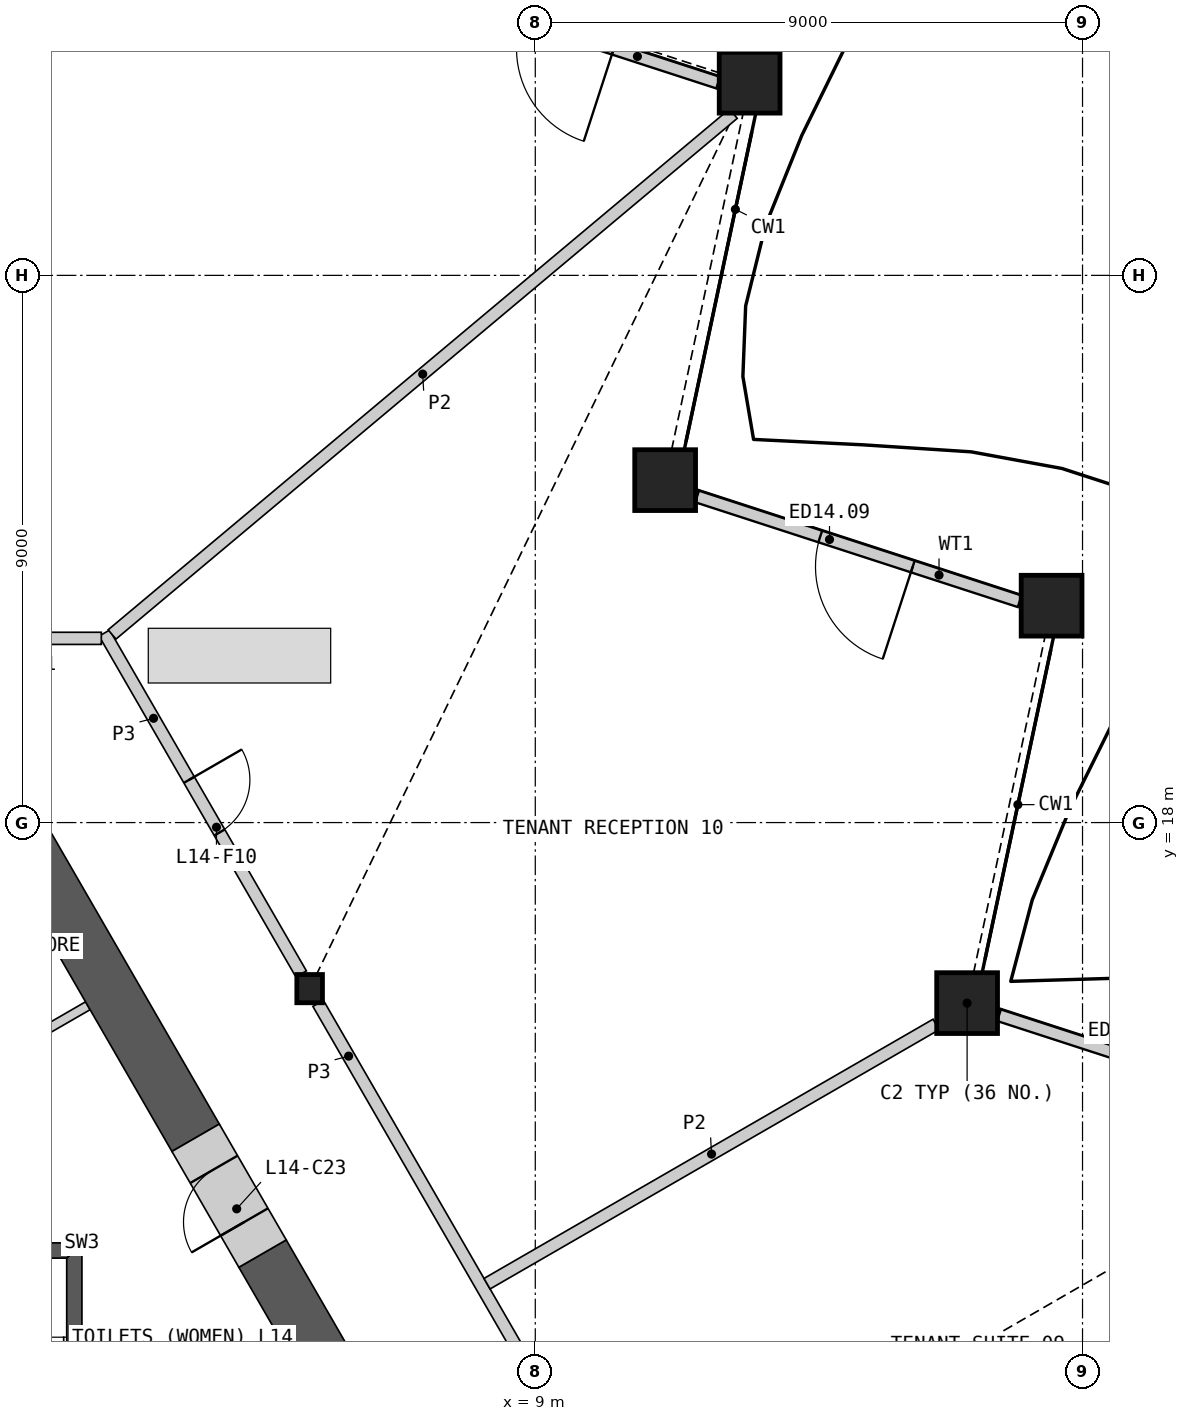
"""IFC4 building model, lengths in metres.
Left out: names, types, materials, properties, quantities, classifications, styles, units other than length and angle.
Written with IfcOpenShell. Run it as: python <this file> out.ifc"""

import sys

from ifc_helpers import new_model, si_unit, direction, frame, frame_2d, origin, origin_2d, place, context, subcontext, project, spatial, polyline, rectangle, hollow_rectangle, i_section, outline, extrude, element, fill, save


model = new_model("IFC4")
c1 = context("Model", 3, precision=1e-05, world=origin(), true_north=direction((0.0, 1.0)))
c2 = subcontext(c1, "Body", "Model", "MODEL_VIEW")
j1 = project(units=[si_unit("LENGTHUNIT", "METRE"), si_unit("PLANEANGLEUNIT", "RADIAN")], contexts=[c1])
p1 = place(None, origin())
s1 = spatial("IfcSite", under=j1, at=p1, CompositionType="ELEMENT")
p2 = place(p1, origin())
s2 = spatial("IfcBuilding", under=s1, at=p2, CompositionType="ELEMENT")
p3 = place(p2, frame((0.0, 0.0, 67.8)))
s3 = spatial("IfcBuildingStorey", under=s2, at=p3, CompositionType="ELEMENT", Elevation=67.8)
for number, where, z_axis, x_axis in (
    (1, (16.102, 15.031, 0.0), (0.0, 0.0, 1.0), (1.0, 0.0, 0.0)),
    (2, (17.491, 21.567, 0.0), (0.0, 0.0, 1.0), (1.0, 0.0, 0.0)),
    (3, (11.136, 23.632, 0.0), (0.0, 0.0, 1.0), (1.0, 0.0, 0.0)),
    (4, (12.525, 30.169, 0.0), (0.0, 0.0, 1.0), (1.0, 0.0, 0.0)),
):
    element("IfcColumn", number, at=place(p3, frame(where, z_axis=z_axis, x_axis=x_axis)), inside=s3, PredefinedType="COLUMN", context=c2, shape_type="SweptSolid", body=[
        extrude(hollow_rectangle(XDim=1.0, YDim=1.0, WallThickness=0.07, at=origin_2d()), origin(), (0.0, 0.0, 1.0), 4.2),
    ])
p4 = place(p3, frame((5.289, 15.269, 0.0), z_axis=(0.0, 0.0, 1.0), x_axis=(1.0, 0.0, 0.0)))
e5 = element("IfcColumn", 5, at=p4, inside=s3, PredefinedType="COLUMN", context=c2, shape_type="SweptSolid", body=[
    extrude(i_section(OverallWidth=0.421, OverallDepth=0.465, WebThickness=0.045, FlangeThickness=0.072, at=origin_2d()), origin(), (0.0, 0.0, 1.0), 4.2),
])
p5 = place(p3, frame((21.933, 13.107, 0.0), z_axis=(0.0, 0.0, 1.0), x_axis=(-0.951066864375, 0.308985144444, 0.0)))
e6 = element("IfcWall", 6, at=p5, inside=s3, PredefinedType="SOLIDWALL", context=c2, shape_type="SweptSolid", body=[
    extrude(rectangle(XDim=5.579, YDim=0.2, at=frame_2d((2.79, 0.0))), origin(), (0.0, 0.0, 1.0), 3.189),
])
p6 = place(p5, frame((1.9, 0.0, 0.0)))
e7 = element("IfcOpeningElement", 7, at=p6, cuts=e6, PredefinedType="OPENING", context=c2, shape_type="SweptSolid", body=[
    extrude(rectangle(XDim=1.6, YDim=2.4, at=frame_2d((0.8, 1.2))), frame((0.0, 0.11, 0.0), z_axis=(0.0, -1.0, 0.0), x_axis=(1.0, 0.0, 0.0)), (0.0, 0.0, 1.0), 0.22),
])
p7 = place(p3, frame((16.967, 21.64, 0.0), z_axis=(0.0, 0.0, 1.0), x_axis=(-0.951054004345, 0.309024725255, 0.0)))
e8 = element("IfcWall", 8, at=p7, inside=s3, PredefinedType="SOLIDWALL", context=c2, shape_type="SweptSolid", body=[
    extrude(rectangle(XDim=5.579, YDim=0.2, at=frame_2d((2.79, 0.0))), origin(), (0.0, 0.0, 1.0), 3.189),
])
p8 = place(p7, frame((1.849, 0.0, 0.0)))
e9 = element("IfcOpeningElement", 9, at=p8, cuts=e8, PredefinedType="OPENING", context=c2, shape_type="SweptSolid", body=[
    extrude(rectangle(XDim=1.6, YDim=2.4, at=frame_2d((0.8, 1.2))), frame((0.0, 0.11, 0.0), z_axis=(0.0, -1.0, 0.0), x_axis=(1.0, 0.0, 0.0)), (0.0, 0.0, 1.0), 0.22),
])
p9 = place(p3, frame((12.008, 30.17, 0.0), z_axis=(0.0, 0.0, 1.0), x_axis=(-0.951054939127, 0.309021848358, 0.0)))
e10 = element("IfcWall", 10, at=p9, inside=s3, PredefinedType="SOLIDWALL", context=c2, shape_type="SweptSolid", body=[
    extrude(rectangle(XDim=5.587, YDim=0.2, at=frame_2d((2.793, 0.0))), origin(), (0.0, 0.0, 1.0), 3.189),
])
p10 = place(p9, frame((1.805, 0.0, 0.0)))
e11 = element("IfcOpeningElement", 11, at=p10, cuts=e10, PredefinedType="OPENING", context=c2, shape_type="SweptSolid", body=[
    extrude(rectangle(XDim=1.6, YDim=2.4, at=frame_2d((0.8, 1.2))), frame((0.0, 0.11, 0.0), z_axis=(0.0, -1.0, 0.0), x_axis=(1.0, 0.0, 0.0)), (0.0, 0.0, 1.0), 0.22),
])
p11 = place(p3, origin())
e12 = element("IfcWall", 12, at=p11, inside=s3, PredefinedType="SHEAR", context=c2, shape_type="SweptSolid", body=[
    extrude(outline(polyline([(1.544, 5.237), (1.544, 11.087), (1.294, 10.837), (1.294, 5.237), (1.544, 5.237)])), origin(), (0.0, 0.0, 1.0), 3.8),
])
p12 = place(p3, origin())
e13 = element("IfcWall", 13, at=p12, inside=s3, PredefinedType="SHEAR", context=c2, shape_type="SweptSolid", body=[
    extrude(outline(polyline([(1.544, 11.087), (-1.544, 11.087), (-1.294, 10.837), (1.294, 10.837), (1.544, 11.087)])), origin(), (0.0, 0.0, 1.0), 3.8),
])
p13 = place(p3, frame((1.641, 14.987, 0.0), z_axis=(0.0, 0.0, 1.0), x_axis=(-0.86602253128, -0.50000497529, 0.0)))
e14 = element("IfcWall", 14, at=p13, inside=s3, PredefinedType="PARTITIONING", context=c2, shape_type="SweptSolid", body=[
    extrude(rectangle(XDim=5.685, YDim=0.15, at=frame_2d((2.843, 0.0))), origin(), (0.0, 0.0, 1.0), 3.8),
])
p14 = place(p3, frame((7.807, 5.208, 0.0), z_axis=(0.0, 0.0, 1.0), x_axis=(-0.499986664161, 0.866033103098, 0.0)))
e15 = element("IfcWall", 15, at=p14, inside=s3, PredefinedType="SHEAR", context=c2, shape_type="SweptSolid", body=[
    extrude(rectangle(XDim=6.586, YDim=0.9, at=frame_2d((3.293, 0.0))), origin(), (0.0, 0.0, 1.0), 3.8),
])
p15 = place(p3, frame((3.414, 12.816, 0.0), z_axis=(0.0, 0.0, 1.0), x_axis=(-0.500006596359, 0.866021595341, 0.0)))
e16 = element("IfcWall", 16, at=p15, inside=s3, PredefinedType="SHEAR", context=c2, shape_type="SweptSolid", body=[
    extrude(rectangle(XDim=6.049, YDim=0.9, at=frame_2d((3.025, 0.0))), origin(), (0.0, 0.0, 1.0), 3.8),
])
p16 = place(p3, frame((4.514, 10.911, 0.0), z_axis=(0.0, 0.0, 1.0), x_axis=(-0.50002983664, 0.866008176907, 0.0)))
e17 = element("IfcWall", 17, at=p16, inside=s3, PredefinedType="SHEAR", context=c2, shape_type="SweptSolid", body=[
    extrude(rectangle(XDim=2.2, YDim=0.9, at=frame_2d((1.1, 0.0))), origin(), (0.0, 0.0, 1.0), 3.8),
])
p17 = place(p16, frame((0.6, 0.0, 0.0)))
e18 = element("IfcOpeningElement", 18, at=p17, cuts=e17, PredefinedType="OPENING", context=c2, shape_type="SweptSolid", body=[
    extrude(rectangle(XDim=1.0, YDim=2.1, at=frame_2d((0.5, 1.05))), frame((0.0, 0.46, 0.0), z_axis=(0.0, -1.0, 0.0), x_axis=(1.0, 0.0, 0.0)), (0.0, 0.0, 1.0), 0.92),
])
p18 = place(p3, frame((5.429, 15.026, 0.0), z_axis=(0.0, 0.0, 1.0), x_axis=(0.50001002959, -0.86601961312, 0.0)))
e19 = element("IfcWall", 19, at=p18, inside=s3, PredefinedType="PARTITIONING", context=c2, shape_type="SweptSolid", body=[
    extrude(rectangle(XDim=10.019, YDim=0.2, at=frame_2d((5.009, 0.0))), origin(), (0.0, 0.0, 1.0), 3.8),
])
p19 = place(p18, frame((7.165, 0.0, 0.0)))
e20 = element("IfcOpeningElement", 20, at=p19, cuts=e19, PredefinedType="OPENING", context=c2, shape_type="SweptSolid", body=[
    extrude(rectangle(XDim=1.0, YDim=2.1, at=frame_2d((0.5, 1.05))), frame((0.0, 0.11, 0.0), z_axis=(0.0, -1.0, 0.0), x_axis=(1.0, 0.0, 0.0)), (0.0, 0.0, 1.0), 0.22),
])
p20 = place(p3, frame((1.913, 21.116, 0.0), z_axis=(0.0, 0.0, 1.0), x_axis=(0.500001069878, -0.866024786089, 0.0)))
e21 = element("IfcWall", 21, at=p20, inside=s3, PredefinedType="PARTITIONING", context=c2, shape_type="SweptSolid", body=[
    extrude(rectangle(XDim=6.473, YDim=0.2, at=frame_2d((3.236, 0.0))), origin(), (0.0, 0.0, 1.0), 3.8),
])
p21 = place(p20, frame((2.787, 0.0, 0.0)))
e22 = element("IfcOpeningElement", 22, at=p21, cuts=e21, PredefinedType="OPENING", context=c2, shape_type="SweptSolid", body=[
    extrude(rectangle(XDim=1.0, YDim=2.1, at=frame_2d((0.5, 1.05))), frame((0.0, 0.11, 0.0), z_axis=(0.0, -1.0, 0.0), x_axis=(1.0, 0.0, 0.0)), (0.0, 0.0, 1.0), 0.22),
])
p22 = place(p3, frame((-1.863, 21.03, 0.0), z_axis=(0.0, 0.0, 1.0), x_axis=(1.0, 0.0, 0.0)))
e23 = element("IfcWall", 23, at=p22, inside=s3, PredefinedType="PARTITIONING", context=c2, shape_type="SweptSolid", body=[
    extrude(rectangle(XDim=3.726, YDim=0.2, at=frame_2d((1.863, 0.0))), origin(), (0.0, 0.0, 1.0), 3.8),
])
p23 = place(p22, frame((0.963, 0.0, 0.0)))
e24 = element("IfcOpeningElement", 24, at=p23, cuts=e23, PredefinedType="OPENING", context=c2, shape_type="SweptSolid", body=[
    extrude(rectangle(XDim=1.8, YDim=2.1, at=frame_2d((0.9, 1.05))), frame((0.0, 0.11, 0.0), z_axis=(0.0, -1.0, 0.0), x_axis=(1.0, 0.0, 0.0)), (0.0, 0.0, 1.0), 0.22),
])
p24 = place(p3, frame((2.04, 21.094, 0.0), z_axis=(0.0, 0.0, 1.0), x_axis=(0.766370381447, 0.642398971388, 0.0)))
e25 = element("IfcWall", 25, at=p24, inside=s3, PredefinedType="PARTITIONING", context=c2, shape_type="SweptSolid", body=[
    extrude(rectangle(XDim=13.332, YDim=0.2, at=frame_2d((6.666, 0.0))), origin(), (0.0, 0.0, 1.0), 2.885),
])
p25 = place(p3, frame((8.207, 10.416, 0.0), z_axis=(0.0, 0.0, 1.0), x_axis=(0.866023490266, 0.500003314297, 0.0)))
e26 = element("IfcWall", 26, at=p25, inside=s3, PredefinedType="PARTITIONING", context=c2, shape_type="SweptSolid", body=[
    extrude(rectangle(XDim=8.528, YDim=0.2, at=frame_2d((4.264, 0.0))), origin(), (0.0, 0.0, 1.0), 2.885),
])
p26 = place(p8, origin())
e27 = element("IfcDoor", 27, at=p26, inside=s3, OperationType="DOUBLE_DOOR_SINGLE_SWING", PredefinedType="DOOR", context=c2, shape_type="SweptSolid", body=[
    extrude(rectangle(XDim=1.6, YDim=2.4, at=frame_2d((0.8, 1.2))), frame((0.0, 0.025, 0.0), z_axis=(0.0, -1.0, 0.0), x_axis=(1.0, 0.0, 0.0)), (0.0, 0.0, 1.0), 0.05),
])
fill(e9, e27)
p27 = place(p17, origin())
e28 = element("IfcDoor", 28, at=p27, inside=s3, OperationType="SINGLE_SWING_LEFT", PredefinedType="DOOR", context=c2, shape_type="SweptSolid", body=[
    extrude(rectangle(XDim=1.0, YDim=2.1, at=frame_2d((0.5, 1.05))), frame((0.0, 0.205, 0.0), z_axis=(0.0, -1.0, 0.0), x_axis=(1.0, 0.0, 0.0)), (0.0, 0.0, 1.0), 0.05),
])
fill(e18, e28)
p28 = place(p21, origin())
e29 = element("IfcDoor", 29, at=p28, inside=s3, OperationType="SINGLE_SWING_LEFT", PredefinedType="DOOR", context=c2, shape_type="SweptSolid", body=[
    extrude(rectangle(XDim=1.0, YDim=2.1, at=frame_2d((0.5, 1.05))), frame((0.0, 0.025, 0.0), z_axis=(0.0, -1.0, 0.0), x_axis=(1.0, 0.0, 0.0)), (0.0, 0.0, 1.0), 0.05),
])
fill(e22, e29)
save(model, sys.argv[1])
